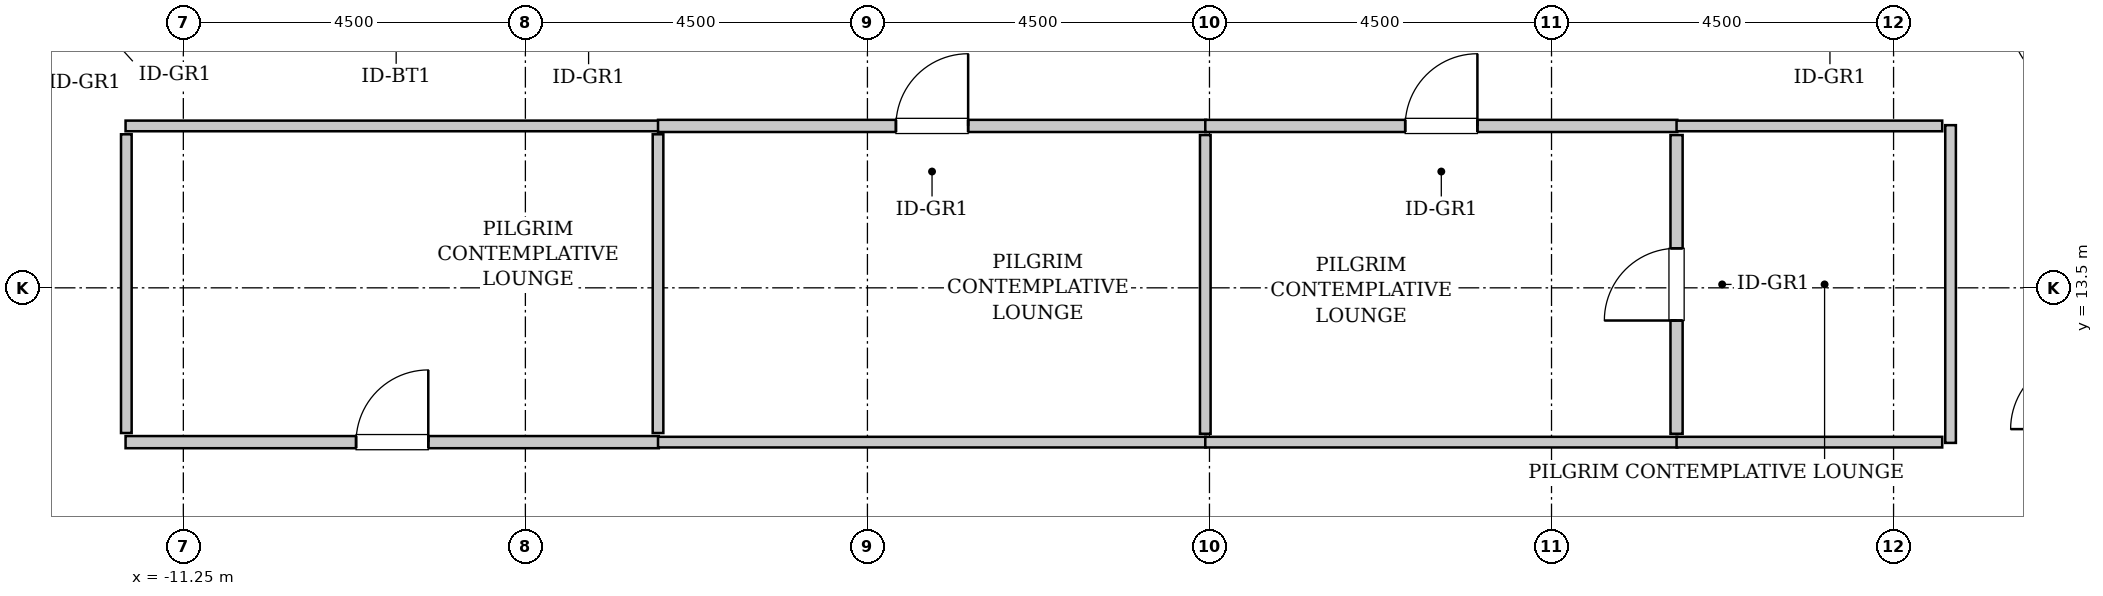
"""IFC4 building model, lengths in metres.
Left out: names, types, materials, properties, quantities, classifications, styles, units other than length and angle.
Written with IfcOpenShell. Run it as: python <this file> out.ifc"""

import sys

from ifc_helpers import new_model, si_unit, direction, frame, frame_2d, origin, place, context, subcontext, project, spatial, rectangle, extrude, source, transform, mapped, element, fill, save


model = new_model("IFC4")
c1 = context("Model", 3, precision=1e-05, world=origin(), true_north=direction((0.0, 1.0)))
c2 = subcontext(c1, "Body", "Model", "MODEL_VIEW")
j1 = project(units=[si_unit("LENGTHUNIT", "METRE"), si_unit("PLANEANGLEUNIT", "RADIAN")], contexts=[c1])
p1 = place(None, origin())
s1 = spatial("IfcSite", under=j1, at=p1, CompositionType="ELEMENT")
p2 = place(p1, origin())
s2 = spatial("IfcBuilding", under=s1, at=p2, CompositionType="ELEMENT")
p3 = place(p2, frame((0.0, 0.0, 240.8)))
s3 = spatial("IfcBuildingStorey", under=s2, at=p3, CompositionType="ELEMENT", Elevation=240.8)
m1 = source(origin(), c2, "Body", "SweptSolid", [
    extrude(rectangle(XDim=7.015, YDim=0.16, at=frame_2d((3.507, 0.0))), origin(), (0.0, 0.0, 1.0), 3.535),
])
p4 = place(p3, frame((-12.01, 11.47, 0.0), z_axis=(0.0, 0.0, 1.0), x_axis=(1.0, 0.0, 0.0)))
e1 = element("IfcWall", 1, at=p4, inside=s3, PredefinedType="PARTITIONING", context=c2, shape_type="MappedRepresentation", body=[
    mapped(m1, transform((0.0, 0.0, 0.0), x_axis=(1.0, 0.0, 0.0), y_axis=(0.0, 1.0, 0.0), z_axis=(0.0, 0.0, 1.0), scale=1.0)),
])
p5 = place(p4, frame((3.032, 0.0, 0.0)))
e2 = element("IfcOpeningElement", 2, at=p5, cuts=e1, PredefinedType="OPENING", context=c2, shape_type="SweptSolid", body=[
    extrude(rectangle(XDim=0.95, YDim=2.1, at=frame_2d((0.475, 1.05))), frame((0.0, 0.09, 0.0), z_axis=(0.0, -1.0, 0.0), x_axis=(1.0, 0.0, 0.0)), (0.0, 0.0, 1.0), 0.18),
])
m2 = source(origin(), c2, "Body", "SweptSolid", [
    extrude(rectangle(XDim=7.015, YDim=0.14, at=frame_2d((3.507, 0.0))), origin(), (0.0, 0.0, 1.0), 3.535),
])
p6 = place(p3, frame((-12.01, 15.63, 0.0), z_axis=(0.0, 0.0, 1.0), x_axis=(1.0, 0.0, 0.0)))
e3 = element("IfcWall", 3, at=p6, inside=s3, PredefinedType="PARTITIONING", context=c2, shape_type="MappedRepresentation", body=[
    mapped(m2, transform((0.0, 0.0, 0.0), x_axis=(1.0, 0.0, 0.0), y_axis=(0.0, 1.0, 0.0), z_axis=(0.0, 0.0, 1.0), scale=1.0)),
])
m3 = source(origin(), c2, "Body", "SweptSolid", [
    extrude(rectangle(XDim=3.93, YDim=0.14, at=frame_2d((1.965, 0.0))), origin(), (0.0, 0.0, 1.0), 3.535),
])
for number, where, z_axis, x_axis in (
    (4, (-12.0, 11.59, 0.0), (0.0, 0.0, 1.0), (0.0, 1.0, 0.0)),
    (5, (-5.005, 11.59, 0.0), (0.0, 0.0, 1.0), (0.0, 1.0, 0.0)),
):
    element("IfcWall", number, at=place(p3, frame(where, z_axis=z_axis, x_axis=x_axis)), inside=s3, PredefinedType="PARTITIONING", context=c2, shape_type="MappedRepresentation", body=[
        mapped(m3, transform((0.0, 0.0, 0.0), x_axis=(1.0, 0.0, 0.0), y_axis=(0.0, 1.0, 0.0), z_axis=(0.0, 0.0, 1.0), scale=1.0)),
    ])
m4 = source(origin(), c2, "Body", "SweptSolid", [
    extrude(rectangle(XDim=7.21, YDim=0.16, at=frame_2d((3.605, 0.0))), origin(), (0.0, 0.0, 1.0), 3.535),
])
p7 = place(p3, frame((-5.005, 15.63, 0.0), z_axis=(0.0, 0.0, 1.0), x_axis=(1.0, 0.0, 0.0)))
e6 = element("IfcWall", 6, at=p7, inside=s3, PredefinedType="PARTITIONING", context=c2, shape_type="MappedRepresentation", body=[
    mapped(m4, transform((0.0, 0.0, 0.0), x_axis=(1.0, 0.0, 0.0), y_axis=(0.0, 1.0, 0.0), z_axis=(0.0, 0.0, 1.0), scale=1.0)),
])
p8 = place(p7, frame((3.13, 0.0, 0.0)))
e7 = element("IfcOpeningElement", 7, at=p8, cuts=e6, PredefinedType="OPENING", context=c2, shape_type="SweptSolid", body=[
    extrude(rectangle(XDim=0.95, YDim=2.1, at=frame_2d((0.475, 1.05))), frame((0.0, 0.09, 0.0), z_axis=(0.0, -1.0, 0.0), x_axis=(1.0, 0.0, 0.0)), (0.0, 0.0, 1.0), 0.18),
])
m5 = source(origin(), c2, "Body", "SweptSolid", [
    extrude(rectangle(XDim=7.21, YDim=0.14, at=frame_2d((3.605, 0.0))), origin(), (0.0, 0.0, 1.0), 3.535),
])
p9 = place(p3, frame((-5.005, 11.47, 0.0), z_axis=(0.0, 0.0, 1.0), x_axis=(1.0, 0.0, 0.0)))
e8 = element("IfcWall", 8, at=p9, inside=s3, PredefinedType="PARTITIONING", context=c2, shape_type="MappedRepresentation", body=[
    mapped(m5, transform((0.0, 0.0, 0.0), x_axis=(1.0, 0.0, 0.0), y_axis=(0.0, 1.0, 0.0), z_axis=(0.0, 0.0, 1.0), scale=1.0)),
])
p10 = place(p3, frame((2.195, 11.58, 0.0), z_axis=(0.0, 0.0, 1.0), x_axis=(0.0, 1.0, 0.0)))
e9 = element("IfcWall", 9, at=p10, inside=s3, PredefinedType="PARTITIONING", context=c2, shape_type="MappedRepresentation", body=[
    mapped(m3, transform((0.0, 0.0, 0.0), x_axis=(1.0, 0.0, 0.0), y_axis=(0.0, 1.0, 0.0), z_axis=(0.0, 0.0, 1.0), scale=1.0)),
])
m6 = source(origin(), c2, "Body", "SweptSolid", [
    extrude(rectangle(XDim=6.21, YDim=0.16, at=frame_2d((3.105, 0.0))), origin(), (0.0, 0.0, 1.0), 3.535),
])
p11 = place(p3, frame((2.195, 15.63, 0.0), z_axis=(0.0, 0.0, 1.0), x_axis=(1.0, 0.0, 0.0)))
e10 = element("IfcWall", 10, at=p11, inside=s3, PredefinedType="PARTITIONING", context=c2, shape_type="MappedRepresentation", body=[
    mapped(m6, transform((0.0, 0.0, 0.0), x_axis=(1.0, 0.0, 0.0), y_axis=(0.0, 1.0, 0.0), z_axis=(0.0, 0.0, 1.0), scale=1.0)),
])
p12 = place(p11, frame((2.63, 0.0, 0.0)))
e11 = element("IfcOpeningElement", 11, at=p12, cuts=e10, PredefinedType="OPENING", context=c2, shape_type="SweptSolid", body=[
    extrude(rectangle(XDim=0.95, YDim=2.1, at=frame_2d((0.475, 1.05))), frame((0.0, 0.09, 0.0), z_axis=(0.0, -1.0, 0.0), x_axis=(1.0, 0.0, 0.0)), (0.0, 0.0, 1.0), 0.18),
])
m7 = source(origin(), c2, "Body", "SweptSolid", [
    extrude(rectangle(XDim=6.21, YDim=0.14, at=frame_2d((3.105, 0.0))), origin(), (0.0, 0.0, 1.0), 3.535),
])
p13 = place(p3, frame((2.195, 11.47, 0.0), z_axis=(0.0, 0.0, 1.0), x_axis=(1.0, 0.0, 0.0)))
e12 = element("IfcWall", 12, at=p13, inside=s3, PredefinedType="PARTITIONING", context=c2, shape_type="MappedRepresentation", body=[
    mapped(m7, transform((0.0, 0.0, 0.0), x_axis=(1.0, 0.0, 0.0), y_axis=(0.0, 1.0, 0.0), z_axis=(0.0, 0.0, 1.0), scale=1.0)),
])
m8 = source(origin(), c2, "Body", "SweptSolid", [
    extrude(rectangle(XDim=3.93, YDim=0.16, at=frame_2d((1.965, 0.0))), origin(), (0.0, 0.0, 1.0), 3.535),
])
p14 = place(p3, frame((8.395, 11.58, 0.0), z_axis=(0.0, 0.0, 1.0), x_axis=(0.0, 1.0, 0.0)))
e13 = element("IfcWall", 13, at=p14, inside=s3, PredefinedType="PARTITIONING", context=c2, shape_type="MappedRepresentation", body=[
    mapped(m8, transform((0.0, 0.0, 0.0), x_axis=(1.0, 0.0, 0.0), y_axis=(0.0, 1.0, 0.0), z_axis=(0.0, 0.0, 1.0), scale=1.0)),
])
p15 = place(p14, frame((1.49, 0.0, 0.0)))
e14 = element("IfcOpeningElement", 14, at=p15, cuts=e13, PredefinedType="OPENING", context=c2, shape_type="SweptSolid", body=[
    extrude(rectangle(XDim=0.95, YDim=2.1, at=frame_2d((0.475, 1.05))), frame((0.0, 0.09, 0.0), z_axis=(0.0, -1.0, 0.0), x_axis=(1.0, 0.0, 0.0)), (0.0, 0.0, 1.0), 0.18),
])
m9 = source(origin(), c2, "Body", "SweptSolid", [
    extrude(rectangle(XDim=4.18, YDim=0.14, at=frame_2d((2.09, 0.0))), origin(), (0.0, 0.0, 1.0), 3.535),
])
p16 = place(p3, frame((12.0, 11.46, 0.0), z_axis=(0.0, 0.0, 1.0), x_axis=(0.0, 1.0, 0.0)))
e15 = element("IfcWall", 15, at=p16, inside=s3, PredefinedType="PARTITIONING", context=c2, shape_type="MappedRepresentation", body=[
    mapped(m9, transform((0.0, 0.0, 0.0), x_axis=(1.0, 0.0, 0.0), y_axis=(0.0, 1.0, 0.0), z_axis=(0.0, 0.0, 1.0), scale=1.0)),
])
m10 = source(origin(), c2, "Body", "SweptSolid", [
    extrude(rectangle(XDim=3.495, YDim=0.14, at=frame_2d((1.748, 0.0))), origin(), (0.0, 0.0, 1.0), 3.535),
])
for number, where, z_axis, x_axis in (
    (16, (8.395, 15.63, 0.0), (0.0, 0.0, 1.0), (1.0, 0.0, 0.0)),
    (17, (8.395, 11.47, 0.0), (0.0, 0.0, 1.0), (1.0, 0.0, 0.0)),
):
    element("IfcWall", number, at=place(p3, frame(where, z_axis=z_axis, x_axis=x_axis)), inside=s3, PredefinedType="PARTITIONING", context=c2, shape_type="MappedRepresentation", body=[
        mapped(m10, transform((0.0, 0.0, 0.0), x_axis=(1.0, 0.0, 0.0), y_axis=(0.0, 1.0, 0.0), z_axis=(0.0, 0.0, 1.0), scale=1.0)),
    ])
m11 = source(origin(), c2, "Body", "SweptSolid", [
    extrude(rectangle(XDim=0.95, YDim=2.1, at=frame_2d((0.475, 1.05))), frame((0.0, 0.025, 0.0), z_axis=(0.0, -1.0, 0.0), x_axis=(1.0, 0.0, 0.0)), (0.0, 0.0, 1.0), 0.05),
])
p17 = place(p5, origin())
e18 = element("IfcDoor", 18, at=p17, inside=s3, OperationType="SINGLE_SWING_RIGHT", PredefinedType="DOOR", context=c2, shape_type="MappedRepresentation", body=[
    mapped(m11, transform((0.0, 0.0, 0.0), x_axis=(1.0, 0.0, 0.0), y_axis=(0.0, 1.0, 0.0), z_axis=(0.0, 0.0, 1.0), scale=1.0)),
])
fill(e2, e18)
p18 = place(p8, origin())
e19 = element("IfcDoor", 19, at=p18, inside=s3, OperationType="SINGLE_SWING_RIGHT", PredefinedType="DOOR", context=c2, shape_type="MappedRepresentation", body=[
    mapped(m11, transform((0.0, 0.0, 0.0), x_axis=(1.0, 0.0, 0.0), y_axis=(0.0, 1.0, 0.0), z_axis=(0.0, 0.0, 1.0), scale=1.0)),
])
fill(e7, e19)
p19 = place(p12, origin())
e20 = element("IfcDoor", 20, at=p19, inside=s3, OperationType="SINGLE_SWING_RIGHT", PredefinedType="DOOR", context=c2, shape_type="MappedRepresentation", body=[
    mapped(m11, transform((0.0, 0.0, 0.0), x_axis=(1.0, 0.0, 0.0), y_axis=(0.0, 1.0, 0.0), z_axis=(0.0, 0.0, 1.0), scale=1.0)),
])
fill(e11, e20)
p20 = place(p15, origin())
e21 = element("IfcDoor", 21, at=p20, inside=s3, OperationType="SINGLE_SWING_LEFT", PredefinedType="DOOR", context=c2, shape_type="MappedRepresentation", body=[
    mapped(m11, transform((0.0, 0.0, 0.0), x_axis=(1.0, 0.0, 0.0), y_axis=(0.0, 1.0, 0.0), z_axis=(0.0, 0.0, 1.0), scale=1.0)),
])
fill(e14, e21)
save(model, sys.argv[1])
